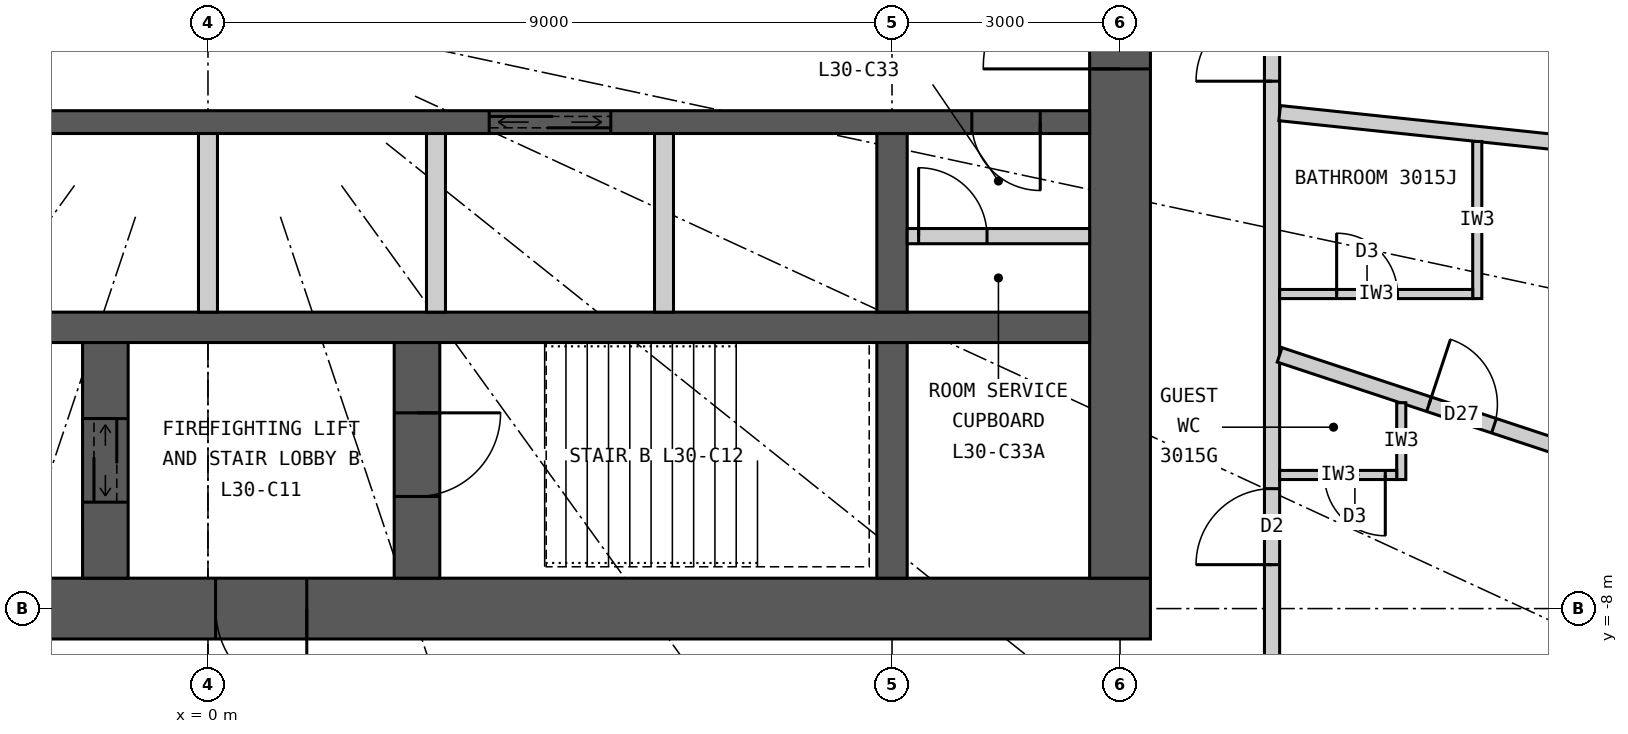
"""IFC4 building model, lengths in metres.
Left out: names, types, materials, properties, quantities, classifications, styles, units other than length and angle.
Written with IfcOpenShell. Run it as: python <this file> out.ifc"""

import sys

from ifc_helpers import new_model, si_unit, direction, frame, frame_2d, origin, place, context, subcontext, project, spatial, rectangle, extrude, element, fill, save


model = new_model("IFC4")
c1 = context("Model", 3, precision=1e-05, world=origin(), true_north=direction((0.0, 1.0)))
c2 = subcontext(c1, "Body", "Model", "MODEL_VIEW")
j1 = project(units=[si_unit("LENGTHUNIT", "METRE"), si_unit("PLANEANGLEUNIT", "RADIAN")], contexts=[c1])
p1 = place(None, origin())
s1 = spatial("IfcSite", under=j1, at=p1, CompositionType="ELEMENT")
p2 = place(p1, origin())
s2 = spatial("IfcBuilding", under=s1, at=p2, CompositionType="ELEMENT")
p3 = place(p2, frame((0.0, 0.0, 118.8)))
s3 = spatial("IfcBuildingStorey", under=s2, at=p3, CompositionType="ELEMENT", Elevation=118.8)
p4 = place(p3, frame((12.4, -8.0, 0.0), z_axis=(0.0, 0.0, 1.0), x_axis=(-1.0, 0.0, 0.0)))
e1 = element("IfcWall", 1, at=p4, inside=s3, PredefinedType="SHEAR", context=c2, shape_type="SweptSolid", body=[
    extrude(rectangle(XDim=24.8, YDim=0.8, at=frame_2d((12.4, 0.0))), origin(), (0.0, 0.0, 1.0), 3.3),
])
p5 = place(p4, frame((11.1, 0.0, 0.0)))
e2 = element("IfcOpeningElement", 2, at=p5, cuts=e1, PredefinedType="OPENING", context=c2, shape_type="SweptSolid", body=[
    extrude(rectangle(XDim=1.2, YDim=2.2, at=frame_2d((0.6, 1.1))), frame((0.0, 0.41, 0.0), z_axis=(0.0, -1.0, 0.0), x_axis=(1.0, 0.0, 0.0)), (0.0, 0.0, 1.0), 0.82),
])
p6 = place(p4, frame((18.7, 0.0, 0.0)))
e3 = element("IfcOpeningElement", 3, at=p6, cuts=e1, PredefinedType="OPENING", context=c2, shape_type="SweptSolid", body=[
    extrude(rectangle(XDim=0.9, YDim=2.2, at=frame_2d((0.45, 1.1))), frame((0.0, 0.41, 0.0), z_axis=(0.0, -1.0, 0.0), x_axis=(1.0, 0.0, 0.0)), (0.0, 0.0, 1.0), 0.82),
])
p7 = place(p3, frame((12.0, -7.6, 0.0), z_axis=(0.0, 0.0, 1.0), x_axis=(0.0, 1.0, 0.0)))
e4 = element("IfcWall", 4, at=p7, inside=s3, PredefinedType="SHEAR", context=c2, shape_type="SweptSolid", body=[
    extrude(rectangle(XDim=15.2, YDim=0.8, at=frame_2d((7.6, 0.0))), origin(), (0.0, 0.0, 1.0), 3.3),
])
p8 = place(p7, frame((6.7, 0.0, 0.0)))
e5 = element("IfcOpeningElement", 5, at=p8, cuts=e4, PredefinedType="OPENING", context=c2, shape_type="SweptSolid", body=[
    extrude(rectangle(XDim=1.8, YDim=2.2, at=frame_2d((0.9, 1.1))), frame((0.0, 0.41, 0.0), z_axis=(0.0, -1.0, 0.0), x_axis=(1.0, 0.0, 0.0)), (0.0, 0.0, 1.0), 0.82),
])
p9 = place(p3, frame((-11.6, -4.3, 0.0), z_axis=(0.0, 0.0, 1.0), x_axis=(1.0, 0.0, 0.0)))
e6 = element("IfcWall", 6, at=p9, inside=s3, PredefinedType="SHEAR", context=c2, shape_type="SweptSolid", body=[
    extrude(rectangle(XDim=23.2, YDim=0.4, at=frame_2d((11.6, 0.0))), origin(), (0.0, 0.0, 1.0), 3.3),
])
p10 = place(p3, frame((-11.6, -1.6, 0.0), z_axis=(0.0, 0.0, 1.0), x_axis=(1.0, 0.0, 0.0)))
e7 = element("IfcWall", 7, at=p10, inside=s3, PredefinedType="SHEAR", context=c2, shape_type="SweptSolid", body=[
    extrude(rectangle(XDim=23.2, YDim=0.3, at=frame_2d((11.6, 0.0))), origin(), (0.0, 0.0, 1.0), 3.3),
])
p11 = place(p10, frame((6.55, 0.0, 0.0)))
e8 = element("IfcOpeningElement", 8, at=p11, cuts=e7, PredefinedType="OPENING", context=c2, shape_type="SweptSolid", body=[
    extrude(rectangle(XDim=1.1, YDim=2.2, at=frame_2d((0.55, 1.1))), frame((0.0, 0.16, 0.0), z_axis=(0.0, -1.0, 0.0), x_axis=(1.0, 0.0, 0.0)), (0.0, 0.0, 1.0), 0.32),
])
p12 = place(p10, frame((15.3, 0.0, 0.0)))
e9 = element("IfcOpeningElement", 9, at=p12, cuts=e7, PredefinedType="OPENING", context=c2, shape_type="SweptSolid", body=[
    extrude(rectangle(XDim=1.6, YDim=2.4, at=frame_2d((0.8, 1.2))), frame((0.0, 0.16, 0.0), z_axis=(0.0, -1.0, 0.0), x_axis=(1.0, 0.0, 0.0)), (0.0, 0.0, 1.0), 0.32),
])
p13 = place(p10, frame((0.65, 0.0, 0.0)))
e10 = element("IfcOpeningElement", 10, at=p13, cuts=e7, PredefinedType="OPENING", context=c2, shape_type="SweptSolid", body=[
    extrude(rectangle(XDim=0.9, YDim=2.2, at=frame_2d((0.45, 1.1))), frame((0.0, 0.16, 0.0), z_axis=(0.0, -1.0, 0.0), x_axis=(1.0, 0.0, 0.0)), (0.0, 0.0, 1.0), 0.32),
])
p14 = place(p10, frame((3.65, 0.0, 0.0)))
e11 = element("IfcOpeningElement", 11, at=p14, cuts=e7, PredefinedType="OPENING", context=c2, shape_type="SweptSolid", body=[
    extrude(rectangle(XDim=0.9, YDim=2.2, at=frame_2d((0.45, 1.1))), frame((0.0, 0.16, 0.0), z_axis=(0.0, -1.0, 0.0), x_axis=(1.0, 0.0, 0.0)), (0.0, 0.0, 1.0), 0.32),
])
p15 = place(p10, frame((21.65, 0.0, 0.0)))
e12 = element("IfcOpeningElement", 12, at=p15, cuts=e7, PredefinedType="OPENING", context=c2, shape_type="SweptSolid", body=[
    extrude(rectangle(XDim=0.9, YDim=2.2, at=frame_2d((0.45, 1.1))), frame((0.0, 0.16, 0.0), z_axis=(0.0, -1.0, 0.0), x_axis=(1.0, 0.0, 0.0)), (0.0, 0.0, 1.0), 0.32),
])
p16 = place(p3, frame((9.0, -4.1, 0.0), z_axis=(0.0, 0.0, 1.0), x_axis=(0.0, 1.0, 0.0)))
e13 = element("IfcWall", 13, at=p16, inside=s3, PredefinedType="SHEAR", context=c2, shape_type="SweptSolid", body=[
    extrude(rectangle(XDim=2.35, YDim=0.4, at=frame_2d((1.175, 0.0))), origin(), (0.0, 0.0, 1.0), 3.3),
])
p17 = place(p3, frame((9.0, -7.6, 0.0), z_axis=(0.0, 0.0, 1.0), x_axis=(0.0, 1.0, 0.0)))
e14 = element("IfcWall", 14, at=p17, inside=s3, PredefinedType="SHEAR", context=c2, shape_type="SweptSolid", body=[
    extrude(rectangle(XDim=3.1, YDim=0.4, at=frame_2d((1.55, 0.0))), origin(), (0.0, 0.0, 1.0), 3.3),
])
p18 = place(p3, frame((2.75, -7.6, 0.0), z_axis=(0.0, 0.0, 1.0), x_axis=(0.0, 1.0, 0.0)))
e15 = element("IfcWall", 15, at=p18, inside=s3, PredefinedType="SHEAR", context=c2, shape_type="SweptSolid", body=[
    extrude(rectangle(XDim=3.1, YDim=0.6, at=frame_2d((1.55, 0.0))), origin(), (0.0, 0.0, 1.0), 3.3),
])
p19 = place(p18, frame((1.075, 0.0, 0.0)))
e16 = element("IfcOpeningElement", 16, at=p19, cuts=e15, PredefinedType="OPENING", context=c2, shape_type="SweptSolid", body=[
    extrude(rectangle(XDim=1.1, YDim=2.2, at=frame_2d((0.55, 1.1))), frame((0.0, 0.31, 0.0), z_axis=(0.0, -1.0, 0.0), x_axis=(1.0, 0.0, 0.0)), (0.0, 0.0, 1.0), 0.62),
])
p20 = place(p3, frame((-1.35, -7.6, 0.0), z_axis=(0.0, 0.0, 1.0), x_axis=(0.0, 1.0, 0.0)))
e17 = element("IfcWall", 17, at=p20, inside=s3, PredefinedType="SHEAR", context=c2, shape_type="SweptSolid", body=[
    extrude(rectangle(XDim=3.1, YDim=0.6, at=frame_2d((1.55, 0.0))), origin(), (0.0, 0.0, 1.0), 3.3),
])
p21 = place(p20, frame((1.0, 0.0, 0.0)))
e18 = element("IfcOpeningElement", 18, at=p21, cuts=e17, PredefinedType="OPENING", context=c2, shape_type="SweptSolid", body=[
    extrude(rectangle(XDim=1.1, YDim=2.2, at=frame_2d((0.55, 1.1))), frame((0.0, 0.31, 0.0), z_axis=(0.0, -1.0, 0.0), x_axis=(1.0, 0.0, 0.0)), (0.0, 0.0, 1.0), 0.62),
])
for number, where, z_axis, x_axis in (
    (19, (0.0, -4.1, 0.0), (0.0, 0.0, 1.0), (0.0, 1.0, 0.0)),
    (20, (3.0, -4.1, 0.0), (0.0, 0.0, 1.0), (0.0, 1.0, 0.0)),
    (21, (6.0, -4.1, 0.0), (0.0, 0.0, 1.0), (0.0, 1.0, 0.0)),
):
    element("IfcWall", number, at=place(p3, frame(where, z_axis=z_axis, x_axis=x_axis)), inside=s3, PredefinedType="PARTITIONING", context=c2, shape_type="SweptSolid", body=[
        extrude(rectangle(XDim=2.35, YDim=0.25, at=frame_2d((1.175, 0.0))), origin(), (0.0, 0.0, 1.0), 3.3),
    ])
p22 = place(p3, frame((14.0, -9.9, 0.0), z_axis=(0.0, 0.0, 1.0), x_axis=(0.0, 1.0, 0.0)))
e22 = element("IfcWall", 22, at=p22, inside=s3, PredefinedType="PARTITIONING", context=c2, shape_type="SweptSolid", body=[
    extrude(rectangle(XDim=19.8, YDim=0.2, at=frame_2d((9.9, 0.0))), origin(), (0.0, 0.0, 1.0), 3.12),
])
p23 = place(p22, frame((2.478, 0.0, 0.0)))
e23 = element("IfcOpeningElement", 23, at=p23, cuts=e22, PredefinedType="OPENING", context=c2, shape_type="SweptSolid", body=[
    extrude(rectangle(XDim=1.0, YDim=2.2, at=frame_2d((0.5, 1.1))), frame((0.0, 0.11, 0.0), z_axis=(0.0, -1.0, 0.0), x_axis=(1.0, 0.0, 0.0)), (0.0, 0.0, 1.0), 0.22),
])
p24 = place(p22, frame((8.838, 0.0, 0.0)))
e24 = element("IfcOpeningElement", 24, at=p24, cuts=e22, PredefinedType="OPENING", context=c2, shape_type="SweptSolid", body=[
    extrude(rectangle(XDim=1.0, YDim=2.2, at=frame_2d((0.5, 1.1))), frame((0.0, 0.11, 0.0), z_axis=(0.0, -1.0, 0.0), x_axis=(1.0, 0.0, 0.0)), (0.0, 0.0, 1.0), 0.22),
])
p25 = place(p22, frame((13.742, 0.0, 0.0)))
e25 = element("IfcOpeningElement", 25, at=p25, cuts=e22, PredefinedType="OPENING", context=c2, shape_type="SweptSolid", body=[
    extrude(rectangle(XDim=1.0, YDim=2.2, at=frame_2d((0.5, 1.1))), frame((0.0, 0.11, 0.0), z_axis=(0.0, -1.0, 0.0), x_axis=(1.0, 0.0, 0.0)), (0.0, 0.0, 1.0), 0.22),
])
p26 = place(p22, frame((18.698, 0.0, 0.0)))
e26 = element("IfcOpeningElement", 26, at=p26, cuts=e22, PredefinedType="OPENING", context=c2, shape_type="SweptSolid", body=[
    extrude(rectangle(XDim=1.0, YDim=2.2, at=frame_2d((0.5, 1.1))), frame((0.0, 0.11, 0.0), z_axis=(0.0, -1.0, 0.0), x_axis=(1.0, 0.0, 0.0)), (0.0, 0.0, 1.0), 0.22),
])
p27 = place(p3, frame((14.1, -4.662, 0.0), z_axis=(0.0, 0.0, 1.0), x_axis=(0.949446466373, -0.313928984789, 0.0)))
e27 = element("IfcWall", 27, at=p27, inside=s3, PredefinedType="PARTITIONING", context=c2, shape_type="SweptSolid", body=[
    extrude(rectangle(XDim=8.797, YDim=0.2, at=frame_2d((4.399, 0.0))), origin(), (0.0, 0.0, 1.0), 3.12),
])
p28 = place(p27, frame((2.07, 0.0, 0.0)))
e28 = element("IfcOpeningElement", 28, at=p28, cuts=e27, PredefinedType="OPENING", context=c2, shape_type="SweptSolid", body=[
    extrude(rectangle(XDim=0.9, YDim=2.1, at=frame_2d((0.45, 1.05))), frame((0.0, 0.11, 0.0), z_axis=(0.0, -1.0, 0.0), x_axis=(1.0, 0.0, 0.0)), (0.0, 0.0, 1.0), 0.22),
])
p29 = place(p3, frame((14.1, -1.482, 0.0), z_axis=(0.0, 0.0, 1.0), x_axis=(0.994523202615, -0.104516024894, 0.0)))
e29 = element("IfcWall", 29, at=p29, inside=s3, PredefinedType="PARTITIONING", context=c2, shape_type="SweptSolid", body=[
    extrude(rectangle(XDim=10.091, YDim=0.2, at=frame_2d((5.045, 0.0))), origin(), (0.0, 0.0, 1.0), 2.47),
])
p30 = place(p3, frame((15.7, -5.291, 0.0), z_axis=(0.0, 0.0, 1.0), x_axis=(0.0, -1.0, 0.0)))
e30 = element("IfcWall", 30, at=p30, inside=s3, PredefinedType="PARTITIONING", context=c2, shape_type="SweptSolid", body=[
    extrude(rectangle(XDim=1.011, YDim=0.12, at=frame_2d((0.505, 0.0))), origin(), (0.0, 0.0, 1.0), 3.12),
])
p31 = place(p3, frame((14.1, -6.242, 0.0), z_axis=(0.0, 0.0, 1.0), x_axis=(1.0, 0.0, 0.0)))
e31 = element("IfcWall", 31, at=p31, inside=s3, PredefinedType="PARTITIONING", context=c2, shape_type="SweptSolid", body=[
    extrude(rectangle(XDim=1.54, YDim=0.12, at=frame_2d((0.77, 0.0))), origin(), (0.0, 0.0, 1.0), 3.12),
])
p32 = place(p31, frame((0.59, 0.0, 0.0)))
e32 = element("IfcOpeningElement", 32, at=p32, cuts=e31, PredefinedType="OPENING", context=c2, shape_type="SweptSolid", body=[
    extrude(rectangle(XDim=0.8, YDim=2.1, at=frame_2d((0.4, 1.05))), frame((0.0, 0.07, 0.0), z_axis=(0.0, -1.0, 0.0), x_axis=(1.0, 0.0, 0.0)), (0.0, 0.0, 1.0), 0.14),
])
p33 = place(p3, frame((16.7, -1.855, 0.0), z_axis=(0.0, 0.0, 1.0), x_axis=(0.0, -1.0, 0.0)))
e33 = element("IfcWall", 33, at=p33, inside=s3, PredefinedType="PARTITIONING", context=c2, shape_type="SweptSolid", body=[
    extrude(rectangle(XDim=2.067, YDim=0.12, at=frame_2d((1.033, 0.0))), origin(), (0.0, 0.0, 1.0), 3.12),
])
p34 = place(p3, frame((14.1, -3.862, 0.0), z_axis=(0.0, 0.0, 1.0), x_axis=(1.0, 0.0, 0.0)))
e34 = element("IfcWall", 34, at=p34, inside=s3, PredefinedType="PARTITIONING", context=c2, shape_type="SweptSolid", body=[
    extrude(rectangle(XDim=2.54, YDim=0.12, at=frame_2d((1.27, 0.0))), origin(), (0.0, 0.0, 1.0), 2.37),
])
p35 = place(p34, frame((0.75, 0.0, 0.0)))
e35 = element("IfcOpeningElement", 35, at=p35, cuts=e34, PredefinedType="OPENING", context=c2, shape_type="SweptSolid", body=[
    extrude(rectangle(XDim=0.8, YDim=2.1, at=frame_2d((0.4, 1.05))), frame((0.0, 0.07, 0.0), z_axis=(0.0, -1.0, 0.0), x_axis=(1.0, 0.0, 0.0)), (0.0, 0.0, 1.0), 0.14),
])
p36 = place(p3, frame((9.2, -3.1, 0.0), z_axis=(0.0, 0.0, 1.0), x_axis=(1.0, 0.0, 0.0)))
e36 = element("IfcWall", 36, at=p36, inside=s3, PredefinedType="PARTITIONING", context=c2, shape_type="SweptSolid", body=[
    extrude(rectangle(XDim=2.4, YDim=0.2, at=frame_2d((1.2, 0.0))), origin(), (0.0, 0.0, 1.0), 3.12),
])
p37 = place(p36, frame((0.15, 0.0, 0.0)))
e37 = element("IfcOpeningElement", 37, at=p37, cuts=e36, PredefinedType="OPENING", context=c2, shape_type="SweptSolid", body=[
    extrude(rectangle(XDim=0.9, YDim=2.2, at=frame_2d((0.45, 1.1))), frame((0.0, 0.11, 0.0), z_axis=(0.0, -1.0, 0.0), x_axis=(1.0, 0.0, 0.0)), (0.0, 0.0, 1.0), 0.22),
])
p38 = place(p32, origin())
e38 = element("IfcDoor", 38, at=p38, inside=s3, OperationType="SINGLE_SWING_RIGHT", PredefinedType="DOOR", context=c2, shape_type="SweptSolid", body=[
    extrude(rectangle(XDim=0.8, YDim=2.1, at=frame_2d((0.4, 1.05))), frame((0.0, 0.025, 0.0), z_axis=(0.0, -1.0, 0.0), x_axis=(1.0, 0.0, 0.0)), (0.0, 0.0, 1.0), 0.05),
])
fill(e32, e38)
p39 = place(p23, origin())
e39 = element("IfcDoor", 39, at=p39, inside=s3, OperationType="SINGLE_SWING_LEFT", PredefinedType="DOOR", context=c2, shape_type="SweptSolid", body=[
    extrude(rectangle(XDim=1.0, YDim=2.2, at=frame_2d((0.5, 1.1))), frame((0.0, 0.025, 0.0), z_axis=(0.0, -1.0, 0.0), x_axis=(1.0, 0.0, 0.0)), (0.0, 0.0, 1.0), 0.05),
])
fill(e23, e39)
p40 = place(p35, origin())
e40 = element("IfcDoor", 40, at=p40, inside=s3, OperationType="SINGLE_SWING_LEFT", PredefinedType="DOOR", context=c2, shape_type="SweptSolid", body=[
    extrude(rectangle(XDim=0.8, YDim=2.1, at=frame_2d((0.4, 1.05))), frame((0.0, 0.025, 0.0), z_axis=(0.0, -1.0, 0.0), x_axis=(1.0, 0.0, 0.0)), (0.0, 0.0, 1.0), 0.05),
])
fill(e35, e40)
p41 = place(p28, origin())
e41 = element("IfcDoor", 41, at=p41, inside=s3, OperationType="SINGLE_SWING_LEFT", PredefinedType="DOOR", context=c2, shape_type="SweptSolid", body=[
    extrude(rectangle(XDim=0.9, YDim=2.1, at=frame_2d((0.45, 1.05))), frame((0.0, 0.025, 0.0), z_axis=(0.0, -1.0, 0.0), x_axis=(1.0, 0.0, 0.0)), (0.0, 0.0, 1.0), 0.05),
])
fill(e28, e41)
p42 = place(p24, origin())
e42 = element("IfcDoor", 42, at=p42, inside=s3, OperationType="SINGLE_SWING_LEFT", PredefinedType="DOOR", context=c2, shape_type="SweptSolid", body=[
    extrude(rectangle(XDim=1.0, YDim=2.2, at=frame_2d((0.5, 1.1))), frame((0.0, 0.025, 0.0), z_axis=(0.0, -1.0, 0.0), x_axis=(1.0, 0.0, 0.0)), (0.0, 0.0, 1.0), 0.05),
])
fill(e24, e42)
p43 = place(p5, origin())
e43 = element("IfcDoor", 43, at=p43, inside=s3, OperationType="SINGLE_SWING_LEFT", PredefinedType="DOOR", context=c2, shape_type="SweptSolid", body=[
    extrude(rectangle(XDim=1.2, YDim=2.2, at=frame_2d((0.6, 1.1))), frame((0.0, 0.025, 0.0), z_axis=(0.0, -1.0, 0.0), x_axis=(1.0, 0.0, 0.0)), (0.0, 0.0, 1.0), 0.05),
])
fill(e2, e43)
p44 = place(p19, origin())
e44 = element("IfcDoor", 44, at=p44, inside=s3, OperationType="SINGLE_SWING_RIGHT", PredefinedType="DOOR", context=c2, shape_type="SweptSolid", body=[
    extrude(rectangle(XDim=1.1, YDim=2.2, at=frame_2d((0.55, 1.1))), frame((0.0, 0.025, 0.0), z_axis=(0.0, -1.0, 0.0), x_axis=(1.0, 0.0, 0.0)), (0.0, 0.0, 1.0), 0.05),
])
fill(e16, e44)
p45 = place(p21, origin())
e45 = element("IfcDoor", 45, at=p45, inside=s3, OperationType="DOUBLE_DOOR_SLIDING", PredefinedType="DOOR", context=c2, shape_type="SweptSolid", body=[
    extrude(rectangle(XDim=1.1, YDim=2.2, at=frame_2d((0.55, 1.1))), frame((0.0, 0.025, 0.0), z_axis=(0.0, -1.0, 0.0), x_axis=(1.0, 0.0, 0.0)), (0.0, 0.0, 1.0), 0.05),
])
fill(e18, e45)
p46 = place(p12, origin())
e46 = element("IfcDoor", 46, at=p46, inside=s3, OperationType="DOUBLE_DOOR_SLIDING", PredefinedType="DOOR", context=c2, shape_type="SweptSolid", body=[
    extrude(rectangle(XDim=1.6, YDim=2.4, at=frame_2d((0.8, 1.2))), frame((0.0, 0.025, 0.0), z_axis=(0.0, -1.0, 0.0), x_axis=(1.0, 0.0, 0.0)), (0.0, 0.0, 1.0), 0.05),
])
fill(e9, e46)
p47 = place(p15, origin())
e47 = element("IfcDoor", 47, at=p47, inside=s3, OperationType="SINGLE_SWING_RIGHT", PredefinedType="DOOR", context=c2, shape_type="SweptSolid", body=[
    extrude(rectangle(XDim=0.9, YDim=2.2, at=frame_2d((0.45, 1.1))), frame((0.0, 0.025, 0.0), z_axis=(0.0, -1.0, 0.0), x_axis=(1.0, 0.0, 0.0)), (0.0, 0.0, 1.0), 0.05),
])
fill(e12, e47)
p48 = place(p37, origin())
e48 = element("IfcDoor", 48, at=p48, inside=s3, OperationType="SINGLE_SWING_LEFT", PredefinedType="DOOR", context=c2, shape_type="SweptSolid", body=[
    extrude(rectangle(XDim=0.9, YDim=2.2, at=frame_2d((0.45, 1.1))), frame((0.0, 0.025, 0.0), z_axis=(0.0, -1.0, 0.0), x_axis=(1.0, 0.0, 0.0)), (0.0, 0.0, 1.0), 0.05),
])
fill(e37, e48)
p49 = place(p8, origin())
e49 = element("IfcDoor", 49, at=p49, inside=s3, OperationType="DOUBLE_DOOR_DOUBLE_SWING", PredefinedType="DOOR", context=c2, shape_type="SweptSolid", body=[
    extrude(rectangle(XDim=1.8, YDim=2.2, at=frame_2d((0.9, 1.1))), frame((0.0, 0.025, 0.0), z_axis=(0.0, -1.0, 0.0), x_axis=(1.0, 0.0, 0.0)), (0.0, 0.0, 1.0), 0.05),
])
fill(e5, e49)
save(model, sys.argv[1])
